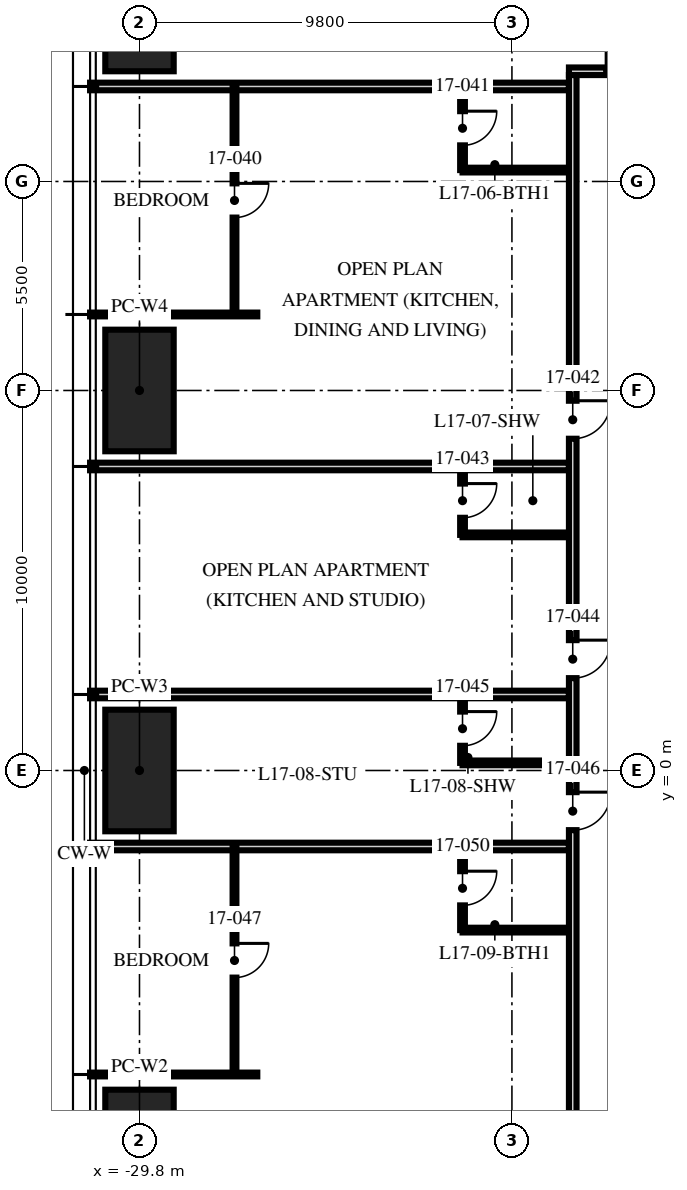
"""IFC4 building model, lengths in metres.
Left out: names, types, materials, properties, quantities, classifications, styles, units other than length and angle.
Written with IfcOpenShell. Run it as: python <this file> out.ifc"""

import sys

from ifc_helpers import new_model, si_unit, direction, frame, frame_2d, origin, origin_2d, place, context, subcontext, project, spatial, rectangle, hollow_rectangle, extrude, element, fill, save


model = new_model("IFC4")
c1 = context("Model", 3, precision=1e-05, world=origin(), true_north=direction((0.0, 1.0)))
c2 = subcontext(c1, "Body", "Model", "MODEL_VIEW")
j1 = project(units=[si_unit("LENGTHUNIT", "METRE"), si_unit("PLANEANGLEUNIT", "RADIAN")], contexts=[c1])
p1 = place(None, origin())
s1 = spatial("IfcSite", under=j1, at=p1, CompositionType="ELEMENT")
p2 = place(p1, origin())
s2 = spatial("IfcBuilding", under=s1, at=p2, CompositionType="ELEMENT")
p3 = place(p2, frame((0.0, 0.0, 69.75)))
s3 = spatial("IfcBuildingStorey", under=s2, at=p3, CompositionType="ELEMENT", Elevation=69.75)
for number, where, z_axis, x_axis in (
    (1, (-29.8, -10.0, 0.0), (0.0, 0.0, 1.0), (0.0, 1.0, 0.0)),
    (2, (-29.8, 0.0, 0.0), (0.0, 0.0, 1.0), (0.0, 1.0, 0.0)),
    (3, (-29.8, 10.0, 0.0), (0.0, 0.0, 1.0), (0.0, 1.0, 0.0)),
    (4, (-29.8, 20.0, 0.0), (0.0, 0.0, 1.0), (0.0, 1.0, 0.0)),
):
    element("IfcColumn", number, at=place(p3, frame(where, z_axis=z_axis, x_axis=x_axis)), inside=s3, PredefinedType="COLUMN", context=c2, shape_type="SweptSolid", body=[
        extrude(hollow_rectangle(XDim=3.2, YDim=1.8, WallThickness=0.2, at=origin_2d()), origin(), (0.0, 0.0, 1.0), 3.75),
    ])
p4 = place(p3, frame((-18.5, 18.0, 0.0), z_axis=(0.0, 0.0, 1.0), x_axis=(-1.0, 0.0, 0.0)))
e5 = element("IfcWall", 5, at=p4, inside=s3, PredefinedType="PARTITIONING", context=c2, shape_type="SweptSolid", body=[
    extrude(rectangle(XDim=12.6, YDim=0.2, at=frame_2d((6.3, 0.0))), origin(), (0.0, 0.0, 1.0), 2.3),
])
p5 = place(p3, frame((-26.7, 12.0, 0.0), z_axis=(0.0, 0.0, 1.0), x_axis=(-1.0, 0.0, 0.0)))
e6 = element("IfcWall", 6, at=p5, inside=s3, PredefinedType="PARTITIONING", context=c2, shape_type="SweptSolid", body=[
    extrude(rectangle(XDim=4.4, YDim=0.1, at=frame_2d((2.2, 0.0))), origin(), (0.0, 0.0, 1.0), 2.71),
])
for number, where, z_axis, x_axis in (
    (7, (-18.5, 8.0, 0.0), (0.0, 0.0, 1.0), (-1.0, 0.0, 0.0)),
    (8, (-18.5, 2.0, 0.0), (0.0, 0.0, 1.0), (-1.0, 0.0, 0.0)),
    (9, (-18.5, -2.0, 0.0), (0.0, 0.0, 1.0), (-1.0, 0.0, 0.0)),
):
    element("IfcWall", number, at=place(p3, frame(where, z_axis=z_axis, x_axis=x_axis)), inside=s3, PredefinedType="PARTITIONING", context=c2, shape_type="SweptSolid", body=[
        extrude(rectangle(XDim=12.6, YDim=0.2, at=frame_2d((6.3, 0.0))), origin(), (0.0, 0.0, 1.0), 2.71),
    ])
p6 = place(p3, frame((-26.7, -8.0, 0.0), z_axis=(0.0, 0.0, 1.0), x_axis=(-1.0, 0.0, 0.0)))
e10 = element("IfcWall", 10, at=p6, inside=s3, PredefinedType="PARTITIONING", context=c2, shape_type="SweptSolid", body=[
    extrude(rectangle(XDim=4.4, YDim=0.1, at=frame_2d((2.2, 0.0))), origin(), (0.0, 0.0, 1.0), 2.71),
])
p7 = place(p3, frame((-27.3, 18.0, 0.0), z_axis=(0.0, 0.0, 1.0), x_axis=(0.0, -1.0, 0.0)))
e11 = element("IfcWall", 11, at=p7, inside=s3, PredefinedType="PARTITIONING", context=c2, shape_type="SweptSolid", body=[
    extrude(rectangle(XDim=6.0, YDim=0.1, at=frame_2d((3.0, 0.0))), origin(), (0.0, 0.0, 1.0), 2.61),
])
p8 = place(p7, frame((2.55, 0.0, 0.0)))
e12 = element("IfcOpeningElement", 12, at=p8, cuts=e11, PredefinedType="OPENING", context=c2, shape_type="SweptSolid", body=[
    extrude(rectangle(XDim=0.9, YDim=2.1, at=frame_2d((0.45, 1.05))), frame((0.0, 0.06, 0.0), z_axis=(0.0, -1.0, 0.0), x_axis=(1.0, 0.0, 0.0)), (0.0, 0.0, 1.0), 0.12),
])
p9 = place(p3, frame((-21.3, 18.0, 0.0), z_axis=(0.0, 0.0, 1.0), x_axis=(0.0, -1.0, 0.0)))
e13 = element("IfcWall", 13, at=p9, inside=s3, PredefinedType="PARTITIONING", context=c2, shape_type="SweptSolid", body=[
    extrude(rectangle(XDim=2.2, YDim=0.125, at=frame_2d((1.1, 0.0))), origin(), (0.0, 0.0, 1.0), 3.5),
])
p10 = place(p9, frame((0.65, 0.0, 0.0)))
e14 = element("IfcOpeningElement", 14, at=p10, cuts=e13, PredefinedType="OPENING", context=c2, shape_type="SweptSolid", body=[
    extrude(rectangle(XDim=0.9, YDim=2.1, at=frame_2d((0.45, 1.05))), frame((0.0, 0.073, 0.0), z_axis=(0.0, -1.0, 0.0), x_axis=(1.0, 0.0, 0.0)), (0.0, 0.0, 1.0), 0.145),
])
p11 = place(p3, frame((-18.5, 15.8, 0.0), z_axis=(0.0, 0.0, 1.0), x_axis=(-1.0, 0.0, 0.0)))
e15 = element("IfcWall", 15, at=p11, inside=s3, PredefinedType="PARTITIONING", context=c2, shape_type="SweptSolid", body=[
    extrude(rectangle(XDim=2.8, YDim=0.125, at=frame_2d((1.4, 0.0))), origin(), (0.0, 0.0, 1.0), 3.5),
])
p12 = place(p3, frame((-21.3, 8.0, 0.0), z_axis=(0.0, 0.0, 1.0), x_axis=(0.0, -1.0, 0.0)))
e16 = element("IfcWall", 16, at=p12, inside=s3, PredefinedType="PARTITIONING", context=c2, shape_type="SweptSolid", body=[
    extrude(rectangle(XDim=1.8, YDim=0.125, at=frame_2d((0.9, 0.0))), origin(), (0.0, 0.0, 1.0), 3.5),
])
p13 = place(p12, frame((0.45, 0.0, 0.0)))
e17 = element("IfcOpeningElement", 17, at=p13, cuts=e16, PredefinedType="OPENING", context=c2, shape_type="SweptSolid", body=[
    extrude(rectangle(XDim=0.9, YDim=2.1, at=frame_2d((0.45, 1.05))), frame((0.0, 0.073, 0.0), z_axis=(0.0, -1.0, 0.0), x_axis=(1.0, 0.0, 0.0)), (0.0, 0.0, 1.0), 0.145),
])
p14 = place(p3, frame((-18.5, 6.2, 0.0), z_axis=(0.0, 0.0, 1.0), x_axis=(-1.0, 0.0, 0.0)))
e18 = element("IfcWall", 18, at=p14, inside=s3, PredefinedType="PARTITIONING", context=c2, shape_type="SweptSolid", body=[
    extrude(rectangle(XDim=2.8, YDim=0.125, at=frame_2d((1.4, 0.0))), origin(), (0.0, 0.0, 1.0), 3.5),
])
p15 = place(p3, frame((-21.3, 2.0, 0.0), z_axis=(0.0, 0.0, 1.0), x_axis=(0.0, -1.0, 0.0)))
e19 = element("IfcWall", 19, at=p15, inside=s3, PredefinedType="PARTITIONING", context=c2, shape_type="SweptSolid", body=[
    extrude(rectangle(XDim=1.8, YDim=0.125, at=frame_2d((0.9, 0.0))), origin(), (0.0, 0.0, 1.0), 3.5),
])
p16 = place(p15, frame((0.45, 0.0, 0.0)))
e20 = element("IfcOpeningElement", 20, at=p16, cuts=e19, PredefinedType="OPENING", context=c2, shape_type="SweptSolid", body=[
    extrude(rectangle(XDim=0.9, YDim=2.1, at=frame_2d((0.45, 1.05))), frame((0.0, 0.073, 0.0), z_axis=(0.0, -1.0, 0.0), x_axis=(1.0, 0.0, 0.0)), (0.0, 0.0, 1.0), 0.145),
])
p17 = place(p3, frame((-18.5, 0.2, 0.0), z_axis=(0.0, 0.0, 1.0), x_axis=(-1.0, 0.0, 0.0)))
e21 = element("IfcWall", 21, at=p17, inside=s3, PredefinedType="PARTITIONING", context=c2, shape_type="SweptSolid", body=[
    extrude(rectangle(XDim=2.8, YDim=0.125, at=frame_2d((1.4, 0.0))), origin(), (0.0, 0.0, 1.0), 2.492),
])
p18 = place(p3, frame((-27.3, -2.0, 0.0), z_axis=(0.0, 0.0, 1.0), x_axis=(0.0, -1.0, 0.0)))
e22 = element("IfcWall", 22, at=p18, inside=s3, PredefinedType="PARTITIONING", context=c2, shape_type="SweptSolid", body=[
    extrude(rectangle(XDim=6.0, YDim=0.1, at=frame_2d((3.0, 0.0))), origin(), (0.0, 0.0, 1.0), 2.61),
])
p19 = place(p18, frame((2.55, 0.0, 0.0)))
e23 = element("IfcOpeningElement", 23, at=p19, cuts=e22, PredefinedType="OPENING", context=c2, shape_type="SweptSolid", body=[
    extrude(rectangle(XDim=0.9, YDim=2.1, at=frame_2d((0.45, 1.05))), frame((0.0, 0.06, 0.0), z_axis=(0.0, -1.0, 0.0), x_axis=(1.0, 0.0, 0.0)), (0.0, 0.0, 1.0), 0.12),
])
p20 = place(p3, frame((-21.3, -2.0, 0.0), z_axis=(0.0, 0.0, 1.0), x_axis=(0.0, -1.0, 0.0)))
e24 = element("IfcWall", 24, at=p20, inside=s3, PredefinedType="PARTITIONING", context=c2, shape_type="SweptSolid", body=[
    extrude(rectangle(XDim=2.2, YDim=0.125, at=frame_2d((1.1, 0.0))), origin(), (0.0, 0.0, 1.0), 3.5),
])
p21 = place(p20, frame((0.65, 0.0, 0.0)))
e25 = element("IfcOpeningElement", 25, at=p21, cuts=e24, PredefinedType="OPENING", context=c2, shape_type="SweptSolid", body=[
    extrude(rectangle(XDim=0.9, YDim=2.1, at=frame_2d((0.45, 1.05))), frame((0.0, 0.073, 0.0), z_axis=(0.0, -1.0, 0.0), x_axis=(1.0, 0.0, 0.0)), (0.0, 0.0, 1.0), 0.145),
])
p22 = place(p3, frame((-18.5, -4.2, 0.0), z_axis=(0.0, 0.0, 1.0), x_axis=(-1.0, 0.0, 0.0)))
e26 = element("IfcWall", 26, at=p22, inside=s3, PredefinedType="PARTITIONING", context=c2, shape_type="SweptSolid", body=[
    extrude(rectangle(XDim=2.8, YDim=0.125, at=frame_2d((1.4, 0.0))), origin(), (0.0, 0.0, 1.0), 3.5),
])
p23 = place(p3, frame((-18.5, 18.4, 0.0), z_axis=(0.0, 0.0, 1.0), x_axis=(1.0, 0.0, 0.0)))
e27 = element("IfcWall", 27, at=p23, inside=s3, PredefinedType="PARTITIONING", context=c2, shape_type="SweptSolid", body=[
    extrude(rectangle(XDim=14.5, YDim=0.2, at=frame_2d((7.25, 0.0))), origin(), (0.0, 0.0, 1.0), 2.3),
])
p24 = place(p23, frame((0.98, 0.0, 0.0)))
e28 = element("IfcOpeningElement", 28, at=p24, cuts=e27, PredefinedType="OPENING", context=c2, shape_type="SweptSolid", body=[
    extrude(rectangle(XDim=1.0, YDim=2.2, at=frame_2d((0.5, 1.1))), frame((0.0, 0.11, 0.0), z_axis=(0.0, -1.0, 0.0), x_axis=(1.0, 0.0, 0.0)), (0.0, 0.0, 1.0), 0.22),
])
p25 = place(p3, frame((-18.4, 18.3, 0.0), z_axis=(0.0, 0.0, 1.0), x_axis=(0.0, -1.0, 0.0)))
e29 = element("IfcWall", 29, at=p25, inside=s3, PredefinedType="PARTITIONING", context=c2, shape_type="SweptSolid", body=[
    extrude(rectangle(XDim=36.6, YDim=0.2, at=frame_2d((18.3, 0.0))), origin(), (0.0, 0.0, 1.0), 2.3),
])
p26 = place(p25, frame((8.57, 0.0, 0.0)))
e30 = element("IfcOpeningElement", 30, at=p26, cuts=e29, PredefinedType="OPENING", context=c2, shape_type="SweptSolid", body=[
    extrude(rectangle(XDim=1.0, YDim=2.2, at=frame_2d((0.5, 1.1))), frame((0.0, 0.11, 0.0), z_axis=(0.0, -1.0, 0.0), x_axis=(1.0, 0.0, 0.0)), (0.0, 0.0, 1.0), 0.22),
])
p27 = place(p25, frame((14.87, 0.0, 0.0)))
e31 = element("IfcOpeningElement", 31, at=p27, cuts=e29, PredefinedType="OPENING", context=c2, shape_type="SweptSolid", body=[
    extrude(rectangle(XDim=1.0, YDim=2.2, at=frame_2d((0.5, 1.1))), frame((0.0, 0.11, 0.0), z_axis=(0.0, -1.0, 0.0), x_axis=(1.0, 0.0, 0.0)), (0.0, 0.0, 1.0), 0.22),
])
p28 = place(p25, frame((18.87, 0.0, 0.0)))
e32 = element("IfcOpeningElement", 32, at=p28, cuts=e29, PredefinedType="OPENING", context=c2, shape_type="SweptSolid", body=[
    extrude(rectangle(XDim=1.0, YDim=2.2, at=frame_2d((0.5, 1.1))), frame((0.0, 0.11, 0.0), z_axis=(0.0, -1.0, 0.0), x_axis=(1.0, 0.0, 0.0)), (0.0, 0.0, 1.0), 0.22),
])
p29 = place(p25, frame((34.82, 0.0, 0.0)))
e33 = element("IfcOpeningElement", 33, at=p29, cuts=e29, PredefinedType="OPENING", context=c2, shape_type="SweptSolid", body=[
    extrude(rectangle(XDim=1.0, YDim=2.2, at=frame_2d((0.5, 1.1))), frame((0.0, 0.11, 0.0), z_axis=(0.0, -1.0, 0.0), x_axis=(1.0, 0.0, 0.0)), (0.0, 0.0, 1.0), 0.22),
])
p30 = place(p24, origin())
e34 = element("IfcDoor", 34, at=p30, inside=s3, OperationType="SINGLE_SWING_LEFT", PredefinedType="DOOR", context=c2, shape_type="SweptSolid", body=[
    extrude(rectangle(XDim=1.0, YDim=2.2, at=frame_2d((0.5, 1.1))), frame((0.0, 0.025, 0.0), z_axis=(0.0, -1.0, 0.0), x_axis=(1.0, 0.0, 0.0)), (0.0, 0.0, 1.0), 0.05),
])
fill(e28, e34)
p31 = place(p8, origin())
e35 = element("IfcDoor", 35, at=p31, inside=s3, OperationType="SINGLE_SWING_LEFT", PredefinedType="DOOR", context=c2, shape_type="SweptSolid", body=[
    extrude(rectangle(XDim=0.9, YDim=2.1, at=frame_2d((0.45, 1.05))), frame((0.0, 0.025, 0.0), z_axis=(0.0, -1.0, 0.0), x_axis=(1.0, 0.0, 0.0)), (0.0, 0.0, 1.0), 0.05),
])
fill(e12, e35)
p32 = place(p10, origin())
e36 = element("IfcDoor", 36, at=p32, inside=s3, OperationType="SINGLE_SWING_LEFT", PredefinedType="DOOR", context=c2, shape_type="SweptSolid", body=[
    extrude(rectangle(XDim=0.9, YDim=2.1, at=frame_2d((0.45, 1.05))), frame((0.0, 0.025, 0.0), z_axis=(0.0, -1.0, 0.0), x_axis=(1.0, 0.0, 0.0)), (0.0, 0.0, 1.0), 0.05),
])
fill(e14, e36)
p33 = place(p26, origin())
e37 = element("IfcDoor", 37, at=p33, inside=s3, OperationType="SINGLE_SWING_LEFT", PredefinedType="DOOR", context=c2, shape_type="SweptSolid", body=[
    extrude(rectangle(XDim=1.0, YDim=2.2, at=frame_2d((0.5, 1.1))), frame((0.0, 0.025, 0.0), z_axis=(0.0, -1.0, 0.0), x_axis=(1.0, 0.0, 0.0)), (0.0, 0.0, 1.0), 0.05),
])
fill(e30, e37)
p34 = place(p13, origin())
e38 = element("IfcDoor", 38, at=p34, inside=s3, OperationType="SINGLE_SWING_LEFT", PredefinedType="DOOR", context=c2, shape_type="SweptSolid", body=[
    extrude(rectangle(XDim=0.9, YDim=2.1, at=frame_2d((0.45, 1.05))), frame((0.0, 0.025, 0.0), z_axis=(0.0, -1.0, 0.0), x_axis=(1.0, 0.0, 0.0)), (0.0, 0.0, 1.0), 0.05),
])
fill(e17, e38)
p35 = place(p27, origin())
e39 = element("IfcDoor", 39, at=p35, inside=s3, OperationType="SINGLE_SWING_LEFT", PredefinedType="DOOR", context=c2, shape_type="SweptSolid", body=[
    extrude(rectangle(XDim=1.0, YDim=2.2, at=frame_2d((0.5, 1.1))), frame((0.0, 0.025, 0.0), z_axis=(0.0, -1.0, 0.0), x_axis=(1.0, 0.0, 0.0)), (0.0, 0.0, 1.0), 0.05),
])
fill(e31, e39)
p36 = place(p16, origin())
e40 = element("IfcDoor", 40, at=p36, inside=s3, OperationType="SINGLE_SWING_LEFT", PredefinedType="DOOR", context=c2, shape_type="SweptSolid", body=[
    extrude(rectangle(XDim=0.9, YDim=2.1, at=frame_2d((0.45, 1.05))), frame((0.0, 0.025, 0.0), z_axis=(0.0, -1.0, 0.0), x_axis=(1.0, 0.0, 0.0)), (0.0, 0.0, 1.0), 0.05),
])
fill(e20, e40)
p37 = place(p28, origin())
e41 = element("IfcDoor", 41, at=p37, inside=s3, OperationType="SINGLE_SWING_LEFT", PredefinedType="DOOR", context=c2, shape_type="SweptSolid", body=[
    extrude(rectangle(XDim=1.0, YDim=2.2, at=frame_2d((0.5, 1.1))), frame((0.0, 0.025, 0.0), z_axis=(0.0, -1.0, 0.0), x_axis=(1.0, 0.0, 0.0)), (0.0, 0.0, 1.0), 0.05),
])
fill(e32, e41)
p38 = place(p19, origin())
e42 = element("IfcDoor", 42, at=p38, inside=s3, OperationType="SINGLE_SWING_LEFT", PredefinedType="DOOR", context=c2, shape_type="SweptSolid", body=[
    extrude(rectangle(XDim=0.9, YDim=2.1, at=frame_2d((0.45, 1.05))), frame((0.0, 0.025, 0.0), z_axis=(0.0, -1.0, 0.0), x_axis=(1.0, 0.0, 0.0)), (0.0, 0.0, 1.0), 0.05),
])
fill(e23, e42)
p39 = place(p21, origin())
e43 = element("IfcDoor", 43, at=p39, inside=s3, OperationType="SINGLE_SWING_LEFT", PredefinedType="DOOR", context=c2, shape_type="SweptSolid", body=[
    extrude(rectangle(XDim=0.9, YDim=2.1, at=frame_2d((0.45, 1.05))), frame((0.0, 0.025, 0.0), z_axis=(0.0, -1.0, 0.0), x_axis=(1.0, 0.0, 0.0)), (0.0, 0.0, 1.0), 0.05),
])
fill(e25, e43)
save(model, sys.argv[1])
